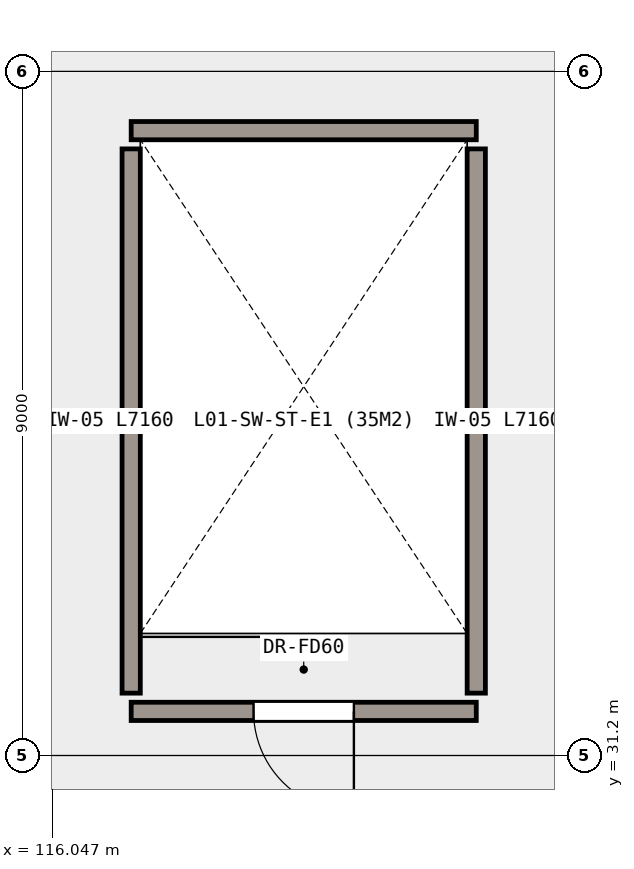
"""IFC4 building model, lengths in metres.
Left out: names, types, materials, properties, quantities, classifications, styles, units other than length and angle.
Written with IfcOpenShell. Run it as: python <this file> out.ifc"""

import sys

from ifc_helpers import new_model, si_unit, direction, frame, frame_2d, origin, place, context, subcontext, project, spatial, rectangle, extrude, element, fill, save


model = new_model("IFC4")
c1 = context("Model", 3, precision=1e-05, world=origin(), true_north=direction((0.0, 1.0)))
c2 = subcontext(c1, "Body", "Model", "MODEL_VIEW")
j1 = project(units=[si_unit("LENGTHUNIT", "METRE"), si_unit("PLANEANGLEUNIT", "RADIAN")], contexts=[c1])
p1 = place(None, origin())
s1 = spatial("IfcSite", under=j1, at=p1, CompositionType="ELEMENT")
p2 = place(p1, origin())
s2 = spatial("IfcBuilding", under=s1, at=p2, CompositionType="ELEMENT")
p3 = place(p2, frame((0.0, 0.0, 5.4)))
s3 = spatial("IfcBuildingStorey", under=s2, at=p3, CompositionType="ELEMENT", Elevation=5.4)
p4 = place(p3, frame((121.62, 31.78, 0.0), z_axis=(0.0, 0.0, 1.0), x_axis=(-1.0, 0.0, 0.0)))
e1 = element("IfcWall", 1, at=p4, inside=s3, PredefinedType="SHEAR", context=c2, shape_type="SweptSolid", body=[
    extrude(rectangle(XDim=4.54, YDim=0.24, at=frame_2d((2.27, 0.0))), origin(), (0.0, 0.0, 1.0), 4.54),
])
p5 = place(p4, frame((1.61, 0.0, 0.0)))
e2 = element("IfcOpeningElement", 2, at=p5, cuts=e1, PredefinedType="OPENING", context=c2, shape_type="SweptSolid", body=[
    extrude(rectangle(XDim=1.32, YDim=2.15, at=frame_2d((0.66, 1.075))), frame((0.0, 0.13, 0.0), z_axis=(0.0, -1.0, 0.0), x_axis=(1.0, 0.0, 0.0)), (0.0, 0.0, 1.0), 0.26),
])
p6 = place(p3, frame((117.08, 39.42, 0.0), z_axis=(0.0, 0.0, 1.0), x_axis=(1.0, 0.0, 0.0)))
e3 = element("IfcWall", 3, at=p6, inside=s3, PredefinedType="SHEAR", context=c2, shape_type="SweptSolid", body=[
    extrude(rectangle(XDim=4.54, YDim=0.24, at=frame_2d((2.27, 0.0))), origin(), (0.0, 0.0, 1.0), 4.54),
])
for number, where, z_axis, x_axis in (
    (4, (117.08, 32.02, 0.0), (0.0, 0.0, 1.0), (0.0, 1.0, 0.0)),
    (5, (121.62, 39.18, 0.0), (0.0, 0.0, 1.0), (0.0, -1.0, 0.0)),
):
    element("IfcWall", number, at=place(p3, frame(where, z_axis=z_axis, x_axis=x_axis)), inside=s3, PredefinedType="SHEAR", context=c2, shape_type="SweptSolid", body=[
        extrude(rectangle(XDim=7.16, YDim=0.24, at=frame_2d((3.58, 0.0))), origin(), (0.0, 0.0, 1.0), 4.54),
    ])
p7 = place(p5, origin())
e6 = element("IfcDoor", 6, at=p7, inside=s3, OperationType="SINGLE_SWING_LEFT", PredefinedType="DOOR", context=c2, shape_type="SweptSolid", body=[
    extrude(rectangle(XDim=1.32, YDim=2.15, at=frame_2d((0.66, 1.075))), frame((0.0, 0.025, 0.0), z_axis=(0.0, -1.0, 0.0), x_axis=(1.0, 0.0, 0.0)), (0.0, 0.0, 1.0), 0.05),
])
fill(e2, e6)
save(model, sys.argv[1])
